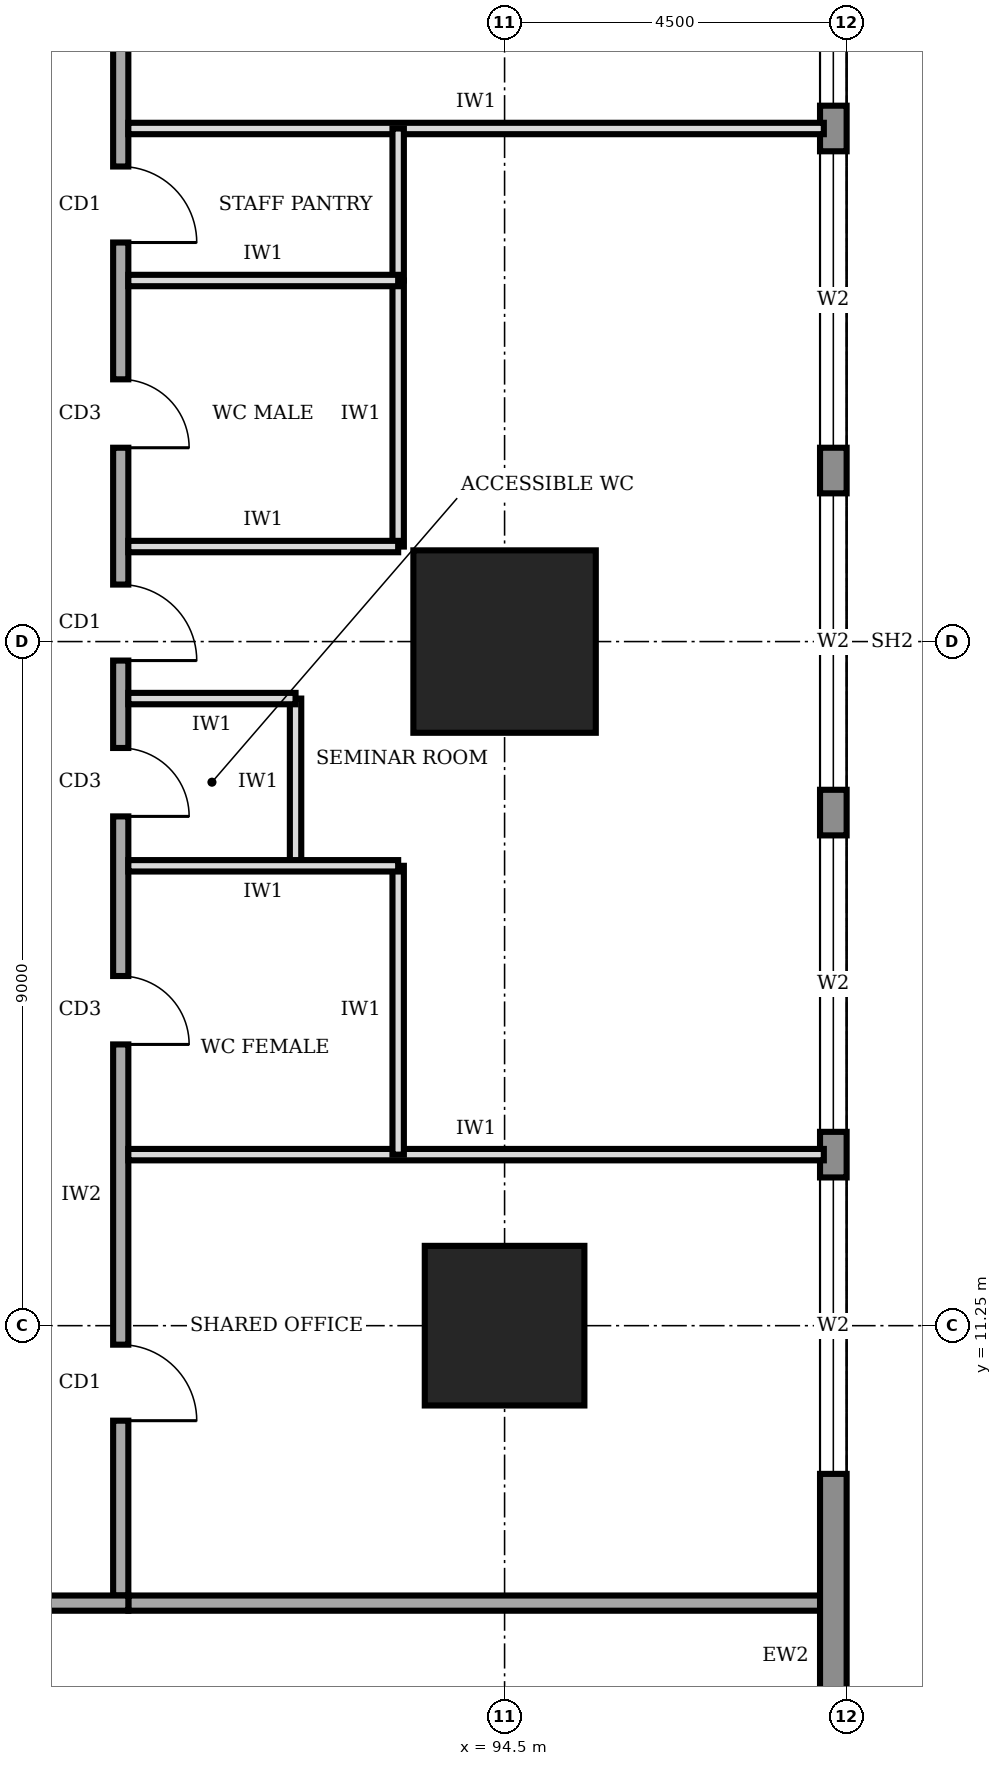
"""IFC4 building model, lengths in metres.
Left out: names, types, materials, properties, quantities, classifications, styles, units other than length and angle.
Written with IfcOpenShell. Run it as: python <this file> out.ifc"""

import sys

from ifc_helpers import new_model, si_unit, direction, frame, frame_2d, origin, origin_2d, place, context, subcontext, project, spatial, rectangle, extrude, element, fill, save


model = new_model("IFC4")
c1 = context("Model", 3, precision=1e-05, world=origin(), true_north=direction((0.0, 1.0)))
c2 = subcontext(c1, "Body", "Model", "MODEL_VIEW")
j1 = project(units=[si_unit("LENGTHUNIT", "METRE"), si_unit("PLANEANGLEUNIT", "RADIAN")], contexts=[c1])
p1 = place(None, origin())
s1 = spatial("IfcSite", under=j1, at=p1, CompositionType="ELEMENT")
p2 = place(p1, origin())
s2 = spatial("IfcBuilding", under=s1, at=p2, CompositionType="ELEMENT")
p3 = place(p2, frame((0.0, 0.0, 61.0)))
s3 = spatial("IfcBuildingStorey", under=s2, at=p3, CompositionType="ELEMENT", Elevation=61.0)
p4 = place(p3, frame((94.5, 11.25, 0.0), z_axis=(0.0, 0.0, 1.0), x_axis=(1.0, 0.0, 0.0)))
e1 = element("IfcColumn", 1, at=p4, inside=s3, PredefinedType="COLUMN", context=c2, shape_type="SweptSolid", body=[
    extrude(rectangle(XDim=2.1, YDim=2.1, at=origin_2d()), origin(), (0.0, 0.0, 1.0), 4.0),
])
p5 = place(p3, frame((94.5, 20.25, 0.0), z_axis=(0.0, 0.0, 1.0), x_axis=(1.0, 0.0, 0.0)))
e2 = element("IfcColumn", 2, at=p5, inside=s3, PredefinedType="COLUMN", context=c2, shape_type="SweptSolid", body=[
    extrude(rectangle(XDim=2.4, YDim=2.4, at=origin_2d()), origin(), (0.0, 0.0, 1.0), 4.0),
])
p6 = place(p3, frame((98.825, 4.52, 0.0), z_axis=(0.0, 0.0, 1.0), x_axis=(0.0, 1.0, 0.0)))
e3 = element("IfcWall", 3, at=p6, inside=s3, PredefinedType="STANDARD", context=c2, shape_type="SweptSolid", body=[
    extrude(rectangle(XDim=31.46, YDim=0.35, at=frame_2d((15.73, 0.0))), origin(), (0.0, 0.0, 1.0), 3.75),
])
p7 = place(p6, frame((4.78, 0.0, 0.6)))
e4 = element("IfcOpeningElement", 4, at=p7, cuts=e3, PredefinedType="OPENING", context=c2, shape_type="SweptSolid", body=[
    extrude(rectangle(XDim=3.9, YDim=2.6, at=frame_2d((1.95, 1.3))), frame((0.0, 0.185, 0.0), z_axis=(0.0, -1.0, 0.0), x_axis=(1.0, 0.0, 0.0)), (0.0, 0.0, 1.0), 0.37),
])
p8 = place(p6, frame((9.28, 0.0, 0.6)))
e5 = element("IfcOpeningElement", 5, at=p8, cuts=e3, PredefinedType="OPENING", context=c2, shape_type="SweptSolid", body=[
    extrude(rectangle(XDim=3.9, YDim=2.6, at=frame_2d((1.95, 1.3))), frame((0.0, 0.185, 0.0), z_axis=(0.0, -1.0, 0.0), x_axis=(1.0, 0.0, 0.0)), (0.0, 0.0, 1.0), 0.37),
])
p9 = place(p6, frame((13.78, 0.0, 0.6)))
e6 = element("IfcOpeningElement", 6, at=p9, cuts=e3, PredefinedType="OPENING", context=c2, shape_type="SweptSolid", body=[
    extrude(rectangle(XDim=3.9, YDim=2.6, at=frame_2d((1.95, 1.3))), frame((0.0, 0.185, 0.0), z_axis=(0.0, -1.0, 0.0), x_axis=(1.0, 0.0, 0.0)), (0.0, 0.0, 1.0), 0.37),
])
p10 = place(p6, frame((18.28, 0.0, 0.6)))
e7 = element("IfcOpeningElement", 7, at=p10, cuts=e3, PredefinedType="OPENING", context=c2, shape_type="SweptSolid", body=[
    extrude(rectangle(XDim=3.9, YDim=2.6, at=frame_2d((1.95, 1.3))), frame((0.0, 0.185, 0.0), z_axis=(0.0, -1.0, 0.0), x_axis=(1.0, 0.0, 0.0)), (0.0, 0.0, 1.0), 0.37),
])
p11 = place(p6, frame((22.78, 0.0, 0.6)))
e8 = element("IfcOpeningElement", 8, at=p11, cuts=e3, PredefinedType="OPENING", context=c2, shape_type="SweptSolid", body=[
    extrude(rectangle(XDim=3.9, YDim=2.6, at=frame_2d((1.95, 1.3))), frame((0.0, 0.185, 0.0), z_axis=(0.0, -1.0, 0.0), x_axis=(1.0, 0.0, 0.0)), (0.0, 0.0, 1.0), 0.37),
])
p12 = place(p6, frame((27.21, 0.0, 0.6)))
e9 = element("IfcOpeningElement", 9, at=p12, cuts=e3, PredefinedType="OPENING", context=c2, shape_type="SweptSolid", body=[
    extrude(rectangle(XDim=3.9, YDim=2.6, at=frame_2d((1.95, 1.3))), frame((0.0, 0.185, 0.0), z_axis=(0.0, -1.0, 0.0), x_axis=(1.0, 0.0, 0.0)), (0.0, 0.0, 1.0), 0.37),
])
p13 = place(p3, frame((72.65, 7.6, 0.0), z_axis=(0.0, 0.0, 1.0), x_axis=(1.0, 0.0, 0.0)))
e10 = element("IfcWall", 10, at=p13, inside=s3, PredefinedType="SOLIDWALL", context=c2, shape_type="SweptSolid", body=[
    extrude(rectangle(XDim=16.9, YDim=0.2, at=frame_2d((8.45, 0.0))), origin(), (0.0, 0.0, 1.0), 3.75),
])
p14 = place(p13, frame((3.175, 0.0, 0.0)))
e11 = element("IfcOpeningElement", 11, at=p14, cuts=e10, PredefinedType="OPENING", context=c2, shape_type="SweptSolid", body=[
    extrude(rectangle(XDim=1.8, YDim=2.1, at=frame_2d((0.9, 1.05))), frame((0.0, 0.11, 0.0), z_axis=(0.0, -1.0, 0.0), x_axis=(1.0, 0.0, 0.0)), (0.0, 0.0, 1.0), 0.22),
])
p15 = place(p13, frame((10.1, 0.0, 0.0)))
e12 = element("IfcOpeningElement", 12, at=p15, cuts=e10, PredefinedType="OPENING", context=c2, shape_type="SweptSolid", body=[
    extrude(rectangle(XDim=1.0, YDim=2.1, at=frame_2d((0.5, 1.05))), frame((0.0, 0.11, 0.0), z_axis=(0.0, -1.0, 0.0), x_axis=(1.0, 0.0, 0.0)), (0.0, 0.0, 1.0), 0.22),
])
p16 = place(p13, frame((14.375, 0.0, 0.0)))
e13 = element("IfcOpeningElement", 13, at=p16, cuts=e10, PredefinedType="OPENING", context=c2, shape_type="SweptSolid", body=[
    extrude(rectangle(XDim=1.0, YDim=2.1, at=frame_2d((0.5, 1.05))), frame((0.0, 0.11, 0.0), z_axis=(0.0, -1.0, 0.0), x_axis=(1.0, 0.0, 0.0)), (0.0, 0.0, 1.0), 0.22),
])
p17 = place(p3, frame((89.45, 7.7, 0.0), z_axis=(0.0, 0.0, 1.0), x_axis=(0.0, 1.0, 0.0)))
e14 = element("IfcWall", 14, at=p17, inside=s3, PredefinedType="SOLIDWALL", context=c2, shape_type="SweptSolid", body=[
    extrude(rectangle(XDim=25.3, YDim=0.2, at=frame_2d((12.65, 0.0))), origin(), (0.0, 0.0, 1.0), 3.75),
])
p18 = place(p17, frame((2.3, 0.0, 0.0)))
e15 = element("IfcOpeningElement", 15, at=p18, cuts=e14, PredefinedType="OPENING", context=c2, shape_type="SweptSolid", body=[
    extrude(rectangle(XDim=1.0, YDim=2.1, at=frame_2d((0.5, 1.05))), frame((0.0, 0.11, 0.0), z_axis=(0.0, -1.0, 0.0), x_axis=(1.0, 0.0, 0.0)), (0.0, 0.0, 1.0), 0.22),
])
p19 = place(p17, frame((7.25, 0.0, 0.0)))
e16 = element("IfcOpeningElement", 16, at=p19, cuts=e14, PredefinedType="OPENING", context=c2, shape_type="SweptSolid", body=[
    extrude(rectangle(XDim=0.9, YDim=2.1, at=frame_2d((0.45, 1.05))), frame((0.0, 0.11, 0.0), z_axis=(0.0, -1.0, 0.0), x_axis=(1.0, 0.0, 0.0)), (0.0, 0.0, 1.0), 0.22),
])
p20 = place(p17, frame((10.25, 0.0, 0.0)))
e17 = element("IfcOpeningElement", 17, at=p20, cuts=e14, PredefinedType="OPENING", context=c2, shape_type="SweptSolid", body=[
    extrude(rectangle(XDim=0.9, YDim=2.1, at=frame_2d((0.45, 1.05))), frame((0.0, 0.11, 0.0), z_axis=(0.0, -1.0, 0.0), x_axis=(1.0, 0.0, 0.0)), (0.0, 0.0, 1.0), 0.22),
])
p21 = place(p17, frame((15.1, 0.0, 0.0)))
e18 = element("IfcOpeningElement", 18, at=p21, cuts=e14, PredefinedType="OPENING", context=c2, shape_type="SweptSolid", body=[
    extrude(rectangle(XDim=0.9, YDim=2.1, at=frame_2d((0.45, 1.05))), frame((0.0, 0.11, 0.0), z_axis=(0.0, -1.0, 0.0), x_axis=(1.0, 0.0, 0.0)), (0.0, 0.0, 1.0), 0.22),
])
p22 = place(p17, frame((17.8, 0.0, 0.0)))
e19 = element("IfcOpeningElement", 19, at=p22, cuts=e14, PredefinedType="OPENING", context=c2, shape_type="SweptSolid", body=[
    extrude(rectangle(XDim=1.0, YDim=2.1, at=frame_2d((0.5, 1.05))), frame((0.0, 0.11, 0.0), z_axis=(0.0, -1.0, 0.0), x_axis=(1.0, 0.0, 0.0)), (0.0, 0.0, 1.0), 0.22),
])
p23 = place(p17, frame((12.3, 0.0, 0.0)))
e20 = element("IfcOpeningElement", 20, at=p23, cuts=e14, PredefinedType="OPENING", context=c2, shape_type="SweptSolid", body=[
    extrude(rectangle(XDim=1.0, YDim=2.1, at=frame_2d((0.5, 1.05))), frame((0.0, 0.11, 0.0), z_axis=(0.0, -1.0, 0.0), x_axis=(1.0, 0.0, 0.0)), (0.0, 0.0, 1.0), 0.22),
])
p24 = place(p17, frame((21.8, 0.0, 0.0)))
e21 = element("IfcOpeningElement", 21, at=p24, cuts=e14, PredefinedType="OPENING", context=c2, shape_type="SweptSolid", body=[
    extrude(rectangle(XDim=1.0, YDim=2.1, at=frame_2d((0.5, 1.05))), frame((0.0, 0.11, 0.0), z_axis=(0.0, -1.0, 0.0), x_axis=(1.0, 0.0, 0.0)), (0.0, 0.0, 1.0), 0.22),
])
p25 = place(p3, frame((89.55, 7.6, 0.0), z_axis=(0.0, 0.0, 1.0), x_axis=(1.0, 0.0, 0.0)))
e22 = element("IfcWall", 22, at=p25, inside=s3, PredefinedType="SOLIDWALL", context=c2, shape_type="SweptSolid", body=[
    extrude(rectangle(XDim=9.15, YDim=0.2, at=frame_2d((4.575, 0.0))), origin(), (0.0, 0.0, 1.0), 3.75),
])
for number, where, z_axis, x_axis in (
    (23, (89.55, 13.5, 0.0), (0.0, 0.0, 1.0), (1.0, 0.0, 0.0)),
    (24, (89.55, 27.0, 0.0), (0.0, 0.0, 1.0), (1.0, 0.0, 0.0)),
):
    element("IfcWall", number, at=place(p3, frame(where, z_axis=z_axis, x_axis=x_axis)), inside=s3, PredefinedType="PARTITIONING", context=c2, shape_type="SweptSolid", body=[
        extrude(rectangle(XDim=9.15, YDim=0.15, at=frame_2d((4.575, 0.0))), origin(), (0.0, 0.0, 1.0), 3.75),
    ])
p26 = place(p3, frame((89.55, 17.3, 0.0), z_axis=(0.0, 0.0, 1.0), x_axis=(1.0, 0.0, 0.0)))
e25 = element("IfcWall", 25, at=p26, inside=s3, PredefinedType="PARTITIONING", context=c2, shape_type="SweptSolid", body=[
    extrude(rectangle(XDim=3.55, YDim=0.15, at=frame_2d((1.775, 0.0))), origin(), (0.0, 0.0, 1.0), 3.75),
])
p27 = place(p3, frame((89.55, 19.5, 0.0), z_axis=(0.0, 0.0, 1.0), x_axis=(1.0, 0.0, 0.0)))
e26 = element("IfcWall", 26, at=p27, inside=s3, PredefinedType="PARTITIONING", context=c2, shape_type="SweptSolid", body=[
    extrude(rectangle(XDim=2.2, YDim=0.15, at=frame_2d((1.1, 0.0))), origin(), (0.0, 0.0, 1.0), 2.85),
])
for number, where, z_axis, x_axis in (
    (27, (89.55, 21.5, 0.0), (0.0, 0.0, 1.0), (1.0, 0.0, 0.0)),
    (28, (89.55, 25.0, 0.0), (0.0, 0.0, 1.0), (1.0, 0.0, 0.0)),
):
    element("IfcWall", number, at=place(p3, frame(where, z_axis=z_axis, x_axis=x_axis)), inside=s3, PredefinedType="PARTITIONING", context=c2, shape_type="SweptSolid", body=[
        extrude(rectangle(XDim=3.55, YDim=0.15, at=frame_2d((1.775, 0.0))), origin(), (0.0, 0.0, 1.0), 3.75),
    ])
p28 = place(p3, frame((93.1, 13.5, 0.0), z_axis=(0.0, 0.0, 1.0), x_axis=(0.0, 1.0, 0.0)))
e29 = element("IfcWall", 29, at=p28, inside=s3, PredefinedType="PARTITIONING", context=c2, shape_type="SweptSolid", body=[
    extrude(rectangle(XDim=3.8, YDim=0.15, at=frame_2d((1.9, 0.0))), origin(), (0.0, 0.0, 1.0), 3.75),
])
p29 = place(p3, frame((91.75, 17.3, 0.0), z_axis=(0.0, 0.0, 1.0), x_axis=(0.0, 1.0, 0.0)))
e30 = element("IfcWall", 30, at=p29, inside=s3, PredefinedType="PARTITIONING", context=c2, shape_type="SweptSolid", body=[
    extrude(rectangle(XDim=2.2, YDim=0.15, at=frame_2d((1.1, 0.0))), origin(), (0.0, 0.0, 1.0), 3.75),
])
p30 = place(p3, frame((93.1, 21.5, 0.0), z_axis=(0.0, 0.0, 1.0), x_axis=(0.0, 1.0, 0.0)))
e31 = element("IfcWall", 31, at=p30, inside=s3, PredefinedType="PARTITIONING", context=c2, shape_type="SweptSolid", body=[
    extrude(rectangle(XDim=3.5, YDim=0.15, at=frame_2d((1.75, 0.0))), origin(), (0.0, 0.0, 1.0), 3.75),
])
p31 = place(p3, frame((93.1, 25.0, 0.0), z_axis=(0.0, 0.0, 1.0), x_axis=(0.0, 1.0, 0.0)))
e32 = element("IfcWall", 32, at=p31, inside=s3, PredefinedType="PARTITIONING", context=c2, shape_type="SweptSolid", body=[
    extrude(rectangle(XDim=2.0, YDim=0.15, at=frame_2d((1.0, 0.0))), origin(), (0.0, 0.0, 1.0), 3.75),
])
p32 = place(p7, origin())
e33 = element("IfcWindow", 33, at=p32, inside=s3, PartitioningType="SINGLE_PANEL", PredefinedType="WINDOW", context=c2, shape_type="SweptSolid", body=[
    extrude(rectangle(XDim=3.9, YDim=2.6, at=frame_2d((1.95, 1.3))), frame((0.0, 0.03, 0.0), z_axis=(0.0, -1.0, 0.0), x_axis=(1.0, 0.0, 0.0)), (0.0, 0.0, 1.0), 0.06),
])
fill(e4, e33)
p33 = place(p8, origin())
e34 = element("IfcWindow", 34, at=p33, inside=s3, PartitioningType="SINGLE_PANEL", PredefinedType="WINDOW", context=c2, shape_type="SweptSolid", body=[
    extrude(rectangle(XDim=3.9, YDim=2.6, at=frame_2d((1.95, 1.3))), frame((0.0, 0.03, 0.0), z_axis=(0.0, -1.0, 0.0), x_axis=(1.0, 0.0, 0.0)), (0.0, 0.0, 1.0), 0.06),
])
fill(e5, e34)
p34 = place(p9, origin())
e35 = element("IfcWindow", 35, at=p34, inside=s3, PartitioningType="SINGLE_PANEL", PredefinedType="WINDOW", context=c2, shape_type="SweptSolid", body=[
    extrude(rectangle(XDim=3.9, YDim=2.6, at=frame_2d((1.95, 1.3))), frame((0.0, 0.03, 0.0), z_axis=(0.0, -1.0, 0.0), x_axis=(1.0, 0.0, 0.0)), (0.0, 0.0, 1.0), 0.06),
])
fill(e6, e35)
p35 = place(p10, origin())
e36 = element("IfcWindow", 36, at=p35, inside=s3, PartitioningType="SINGLE_PANEL", PredefinedType="WINDOW", context=c2, shape_type="SweptSolid", body=[
    extrude(rectangle(XDim=3.9, YDim=2.6, at=frame_2d((1.95, 1.3))), frame((0.0, 0.03, 0.0), z_axis=(0.0, -1.0, 0.0), x_axis=(1.0, 0.0, 0.0)), (0.0, 0.0, 1.0), 0.06),
])
fill(e7, e36)
p36 = place(p11, origin())
e37 = element("IfcWindow", 37, at=p36, inside=s3, PartitioningType="SINGLE_PANEL", PredefinedType="WINDOW", context=c2, shape_type="SweptSolid", body=[
    extrude(rectangle(XDim=3.9, YDim=2.6, at=frame_2d((1.95, 1.3))), frame((0.0, 0.03, 0.0), z_axis=(0.0, -1.0, 0.0), x_axis=(1.0, 0.0, 0.0)), (0.0, 0.0, 1.0), 0.06),
])
fill(e8, e37)
p37 = place(p18, frame((1.0, 0.0, 0.0), z_axis=(0.0, 0.0, 1.0), x_axis=(-1.0, 0.0, 0.0)))
e38 = element("IfcDoor", 38, at=p37, inside=s3, OperationType="SINGLE_SWING_RIGHT", PredefinedType="DOOR", context=c2, shape_type="SweptSolid", body=[
    extrude(rectangle(XDim=1.0, YDim=2.1, at=frame_2d((0.5, 1.05))), frame((0.0, 0.025, 0.0), z_axis=(0.0, -1.0, 0.0), x_axis=(1.0, 0.0, 0.0)), (0.0, 0.0, 1.0), 0.05),
])
fill(e15, e38)
p38 = place(p19, frame((0.9, 0.0, 0.0), z_axis=(0.0, 0.0, 1.0), x_axis=(-1.0, 0.0, 0.0)))
e39 = element("IfcDoor", 39, at=p38, inside=s3, OperationType="SINGLE_SWING_RIGHT", PredefinedType="DOOR", context=c2, shape_type="SweptSolid", body=[
    extrude(rectangle(XDim=0.9, YDim=2.1, at=frame_2d((0.45, 1.05))), frame((0.0, 0.025, 0.0), z_axis=(0.0, -1.0, 0.0), x_axis=(1.0, 0.0, 0.0)), (0.0, 0.0, 1.0), 0.05),
])
fill(e16, e39)
p39 = place(p20, frame((0.9, 0.0, 0.0), z_axis=(0.0, 0.0, 1.0), x_axis=(-1.0, 0.0, 0.0)))
e40 = element("IfcDoor", 40, at=p39, inside=s3, OperationType="SINGLE_SWING_RIGHT", PredefinedType="DOOR", context=c2, shape_type="SweptSolid", body=[
    extrude(rectangle(XDim=0.9, YDim=2.1, at=frame_2d((0.45, 1.05))), frame((0.0, 0.025, 0.0), z_axis=(0.0, -1.0, 0.0), x_axis=(1.0, 0.0, 0.0)), (0.0, 0.0, 1.0), 0.05),
])
fill(e17, e40)
p40 = place(p21, frame((0.9, 0.0, 0.0), z_axis=(0.0, 0.0, 1.0), x_axis=(-1.0, 0.0, 0.0)))
e41 = element("IfcDoor", 41, at=p40, inside=s3, OperationType="SINGLE_SWING_RIGHT", PredefinedType="DOOR", context=c2, shape_type="SweptSolid", body=[
    extrude(rectangle(XDim=0.9, YDim=2.1, at=frame_2d((0.45, 1.05))), frame((0.0, 0.025, 0.0), z_axis=(0.0, -1.0, 0.0), x_axis=(1.0, 0.0, 0.0)), (0.0, 0.0, 1.0), 0.05),
])
fill(e18, e41)
p41 = place(p22, frame((1.0, 0.0, 0.0), z_axis=(0.0, 0.0, 1.0), x_axis=(-1.0, 0.0, 0.0)))
e42 = element("IfcDoor", 42, at=p41, inside=s3, OperationType="SINGLE_SWING_RIGHT", PredefinedType="DOOR", context=c2, shape_type="SweptSolid", body=[
    extrude(rectangle(XDim=1.0, YDim=2.1, at=frame_2d((0.5, 1.05))), frame((0.0, 0.025, 0.0), z_axis=(0.0, -1.0, 0.0), x_axis=(1.0, 0.0, 0.0)), (0.0, 0.0, 1.0), 0.05),
])
fill(e19, e42)
p42 = place(p23, frame((1.0, 0.0, 0.0), z_axis=(0.0, 0.0, 1.0), x_axis=(-1.0, 0.0, 0.0)))
e43 = element("IfcDoor", 43, at=p42, inside=s3, OperationType="SINGLE_SWING_RIGHT", PredefinedType="DOOR", context=c2, shape_type="SweptSolid", body=[
    extrude(rectangle(XDim=1.0, YDim=2.1, at=frame_2d((0.5, 1.05))), frame((0.0, 0.025, 0.0), z_axis=(0.0, -1.0, 0.0), x_axis=(1.0, 0.0, 0.0)), (0.0, 0.0, 1.0), 0.05),
])
fill(e20, e43)
save(model, sys.argv[1])
